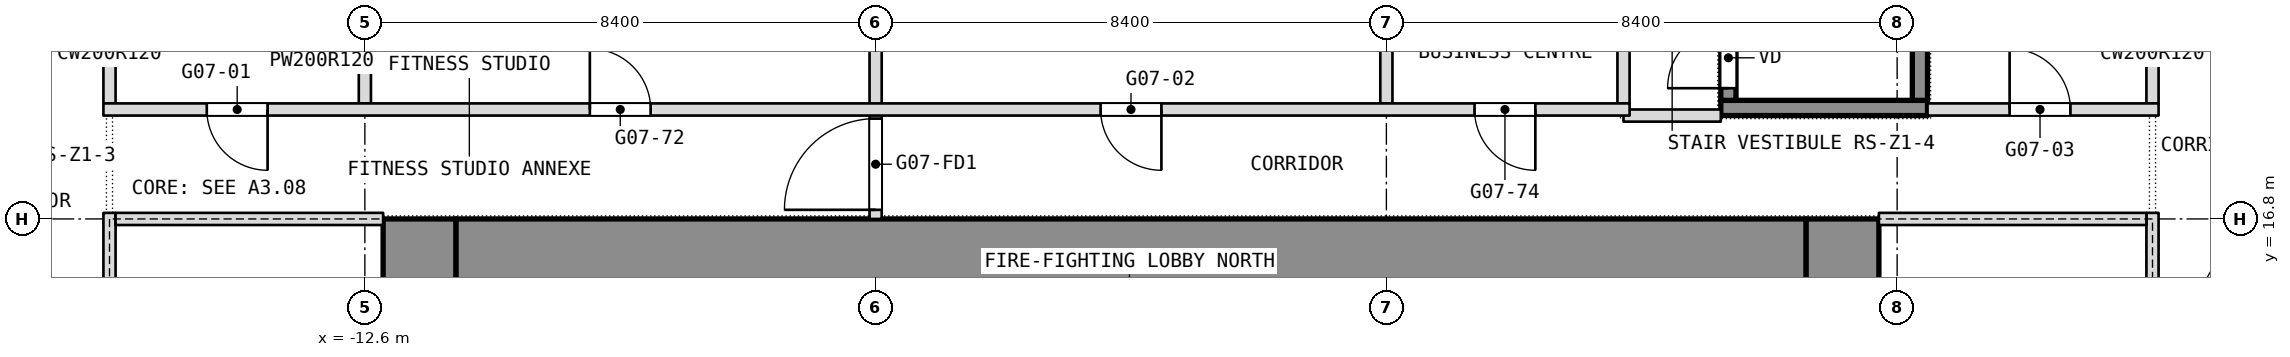
"""IFC4 building model, lengths in metres.
Left out: names, types, materials, properties, quantities, classifications, styles, units other than length and angle.
Written with IfcOpenShell. Run it as: python <this file> out.ifc"""

import sys

from ifc_helpers import new_model, si_unit, direction, frame, frame_2d, origin, place, context, subcontext, project, spatial, rectangle, extrude, element, fill, save


model = new_model("IFC4")
c1 = context("Model", 3, precision=1e-05, world=origin(), true_north=direction((0.0, 1.0)))
c2 = subcontext(c1, "Body", "Model", "MODEL_VIEW")
j1 = project(units=[si_unit("LENGTHUNIT", "METRE"), si_unit("PLANEANGLEUNIT", "RADIAN")], contexts=[c1])
p1 = place(None, origin())
s1 = spatial("IfcSite", under=j1, at=p1, CompositionType="ELEMENT")
p2 = place(p1, origin())
s2 = spatial("IfcBuilding", under=s1, at=p2, CompositionType="ELEMENT")
p3 = place(p2, frame((0.0, 0.0, 79.7)))
s3 = spatial("IfcBuildingStorey", under=s2, at=p3, CompositionType="ELEMENT", Elevation=79.7)
p4 = place(p3, frame((11.7, 0.0, 0.0), z_axis=(0.0, 0.0, 1.0), x_axis=(0.0, 1.0, 0.0)))
e1 = element("IfcWall", 1, at=p4, inside=s3, PredefinedType="SHEAR", context=c2, shape_type="SweptSolid", body=[
    extrude(rectangle(XDim=16.8, YDim=1.2, at=frame_2d((8.4, 0.0))), origin(), (0.0, 0.0, 1.0), 3.6),
])
p5 = place(p4, frame((3.6, 0.0, 0.0)))
e2 = element("IfcOpeningElement", 2, at=p5, cuts=e1, PredefinedType="OPENING", context=c2, shape_type="SweptSolid", body=[
    extrude(rectangle(XDim=0.9, YDim=2.1, at=frame_2d((0.45, 1.05))), frame((0.0, 0.6, 0.0), z_axis=(0.0, -1.0, 0.0), x_axis=(1.0, 0.0, 0.0)), (0.0, 0.0, 1.0), 1.2),
])
p6 = place(p4, frame((6.825, 0.0, 0.0)))
e3 = element("IfcOpeningElement", 3, at=p6, cuts=e1, PredefinedType="OPENING", context=c2, shape_type="SweptSolid", body=[
    extrude(rectangle(XDim=1.2, YDim=2.1, at=frame_2d((0.6, 1.05))), frame((0.0, 0.6, 0.0), z_axis=(0.0, -1.0, 0.0), x_axis=(1.0, 0.0, 0.0)), (0.0, 0.0, 1.0), 1.2),
])
p7 = place(p4, frame((14.212, 0.0, 0.0)))
e4 = element("IfcOpeningElement", 4, at=p7, cuts=e1, PredefinedType="OPENING", context=c2, shape_type="SweptSolid", body=[
    extrude(rectangle(XDim=0.9, YDim=2.1, at=frame_2d((0.45, 1.05))), frame((0.0, 0.6, 0.0), z_axis=(0.0, -1.0, 0.0), x_axis=(1.0, 0.0, 0.0)), (0.0, 0.0, 1.0), 1.2),
])
p8 = place(p4, frame((11.587, 0.0, 0.0)))
e5 = element("IfcOpeningElement", 5, at=p8, cuts=e1, PredefinedType="OPENING", context=c2, shape_type="SweptSolid", body=[
    extrude(rectangle(XDim=0.9, YDim=2.1, at=frame_2d((0.45, 1.05))), frame((0.0, 0.6, 0.0), z_axis=(0.0, -1.0, 0.0), x_axis=(1.0, 0.0, 0.0)), (0.0, 0.0, 1.0), 1.2),
])
p9 = place(p4, frame((8.775, 0.0, 0.0)))
e6 = element("IfcOpeningElement", 6, at=p9, cuts=e1, PredefinedType="OPENING", context=c2, shape_type="SweptSolid", body=[
    extrude(rectangle(XDim=1.2, YDim=2.1, at=frame_2d((0.6, 1.05))), frame((0.0, 0.6, 0.0), z_axis=(0.0, -1.0, 0.0), x_axis=(1.0, 0.0, 0.0)), (0.0, 0.0, 1.0), 1.2),
])
p10 = place(p3, frame((-11.7, 0.0, 0.0), z_axis=(0.0, 0.0, 1.0), x_axis=(0.0, 1.0, 0.0)))
e7 = element("IfcWall", 7, at=p10, inside=s3, PredefinedType="SHEAR", context=c2, shape_type="SweptSolid", body=[
    extrude(rectangle(XDim=16.8, YDim=1.2, at=frame_2d((8.4, 0.0))), origin(), (0.0, 0.0, 1.0), 3.6),
])
p11 = place(p10, frame((2.3, 0.0, 0.0)))
e8 = element("IfcOpeningElement", 8, at=p11, cuts=e7, PredefinedType="OPENING", context=c2, shape_type="SweptSolid", body=[
    extrude(rectangle(XDim=1.1, YDim=2.1, at=frame_2d((0.55, 1.05))), frame((0.0, 0.6, 0.0), z_axis=(0.0, -1.0, 0.0), x_axis=(1.0, 0.0, 0.0)), (0.0, 0.0, 1.0), 1.2),
])
p12 = place(p10, frame((4.85, 0.0, 0.0)))
e9 = element("IfcOpeningElement", 9, at=p12, cuts=e7, PredefinedType="OPENING", context=c2, shape_type="SweptSolid", body=[
    extrude(rectangle(XDim=1.1, YDim=2.1, at=frame_2d((0.55, 1.05))), frame((0.0, 0.6, 0.0), z_axis=(0.0, -1.0, 0.0), x_axis=(1.0, 0.0, 0.0)), (0.0, 0.0, 1.0), 1.2),
])
p13 = place(p10, frame((6.825, 0.0, 0.0)))
e10 = element("IfcOpeningElement", 10, at=p13, cuts=e7, PredefinedType="OPENING", context=c2, shape_type="SweptSolid", body=[
    extrude(rectangle(XDim=1.2, YDim=2.1, at=frame_2d((0.6, 1.05))), frame((0.0, 0.6, 0.0), z_axis=(0.0, -1.0, 0.0), x_axis=(1.0, 0.0, 0.0)), (0.0, 0.0, 1.0), 1.2),
])
p14 = place(p10, frame((13.4, 0.0, 0.0)))
e11 = element("IfcOpeningElement", 11, at=p14, cuts=e7, PredefinedType="OPENING", context=c2, shape_type="SweptSolid", body=[
    extrude(rectangle(XDim=1.1, YDim=2.1, at=frame_2d((0.55, 1.05))), frame((0.0, 0.6, 0.0), z_axis=(0.0, -1.0, 0.0), x_axis=(1.0, 0.0, 0.0)), (0.0, 0.0, 1.0), 1.2),
])
p15 = place(p10, frame((10.85, 0.0, 0.0)))
e12 = element("IfcOpeningElement", 12, at=p15, cuts=e7, PredefinedType="OPENING", context=c2, shape_type="SweptSolid", body=[
    extrude(rectangle(XDim=1.1, YDim=2.1, at=frame_2d((0.55, 1.05))), frame((0.0, 0.6, 0.0), z_axis=(0.0, -1.0, 0.0), x_axis=(1.0, 0.0, 0.0)), (0.0, 0.0, 1.0), 1.2),
])
p16 = place(p10, frame((8.775, 0.0, 0.0)))
e13 = element("IfcOpeningElement", 13, at=p16, cuts=e7, PredefinedType="OPENING", context=c2, shape_type="SweptSolid", body=[
    extrude(rectangle(XDim=1.2, YDim=2.1, at=frame_2d((0.6, 1.05))), frame((0.0, 0.6, 0.0), z_axis=(0.0, -1.0, 0.0), x_axis=(1.0, 0.0, 0.0)), (0.0, 0.0, 1.0), 1.2),
])
p17 = place(p3, frame((-11.1, 16.2, 0.0), z_axis=(0.0, 0.0, 1.0), x_axis=(1.0, 0.0, 0.0)))
e14 = element("IfcWall", 14, at=p17, inside=s3, PredefinedType="SHEAR", context=c2, shape_type="SweptSolid", body=[
    extrude(rectangle(XDim=22.2, YDim=1.2, at=frame_2d((11.1, 0.0))), origin(), (0.0, 0.0, 1.0), 3.6),
])
p18 = place(p3, frame((16.8, 18.7, 0.0), z_axis=(0.0, 0.0, 1.0), x_axis=(0.0, 1.0, 0.0)))
e15 = element("IfcWall", 15, at=p18, inside=s3, PredefinedType="PARTITIONING", context=c2, shape_type="SweptSolid", body=[
    extrude(rectangle(XDim=3.0, YDim=0.2, at=frame_2d((1.5, 0.0))), origin(), (0.0, 0.0, 1.0), 3.34),
])
for number, where, z_axis, x_axis in (
    (16, (8.1, 18.7, 0.0), (0.0, 0.0, 1.0), (0.0, 1.0, 0.0)),
    (17, (4.2, 18.7, 0.0), (0.0, 0.0, 1.0), (0.0, 1.0, 0.0)),
):
    element("IfcWall", number, at=place(p3, frame(where, z_axis=z_axis, x_axis=x_axis)), inside=s3, PredefinedType="PARTITIONING", context=c2, shape_type="SweptSolid", body=[
        extrude(rectangle(XDim=2.8, YDim=0.2, at=frame_2d((1.4, 0.0))), origin(), (0.0, 0.0, 1.0), 3.34),
    ])
p19 = place(p3, frame((-4.2, 16.8, 0.0), z_axis=(0.0, 0.0, 1.0), x_axis=(0.0, 1.0, 0.0)))
e18 = element("IfcWall", 18, at=p19, inside=s3, PredefinedType="PARTITIONING", context=c2, shape_type="SweptSolid", body=[
    extrude(rectangle(XDim=6.7, YDim=0.2, at=frame_2d((3.35, 0.0))), origin(), (0.0, 0.0, 1.0), 3.34),
])
p20 = place(p19, frame((0.15, 0.0, 0.0)))
e19 = element("IfcOpeningElement", 19, at=p20, cuts=e18, PredefinedType="OPENING", context=c2, shape_type="SweptSolid", body=[
    extrude(rectangle(XDim=1.5, YDim=2.1, at=frame_2d((0.75, 1.05))), frame((0.0, 0.1, 0.0), z_axis=(0.0, -1.0, 0.0), x_axis=(1.0, 0.0, 0.0)), (0.0, 0.0, 1.0), 0.2),
])
p21 = place(p19, frame((4.95, 0.0, 0.0)))
e20 = element("IfcOpeningElement", 20, at=p21, cuts=e18, PredefinedType="OPENING", context=c2, shape_type="SweptSolid", body=[
    extrude(rectangle(XDim=1.5, YDim=2.1, at=frame_2d((0.75, 1.05))), frame((0.0, 0.1, 0.0), z_axis=(0.0, -1.0, 0.0), x_axis=(1.0, 0.0, 0.0)), (0.0, 0.0, 1.0), 0.2),
])
p22 = place(p3, frame((-12.6, 18.7, 0.0), z_axis=(0.0, 0.0, 1.0), x_axis=(0.0, 1.0, 0.0)))
e21 = element("IfcWall", 21, at=p22, inside=s3, PredefinedType="PARTITIONING", context=c2, shape_type="SweptSolid", body=[
    extrude(rectangle(XDim=2.8, YDim=0.2, at=frame_2d((1.4, 0.0))), origin(), (0.0, 0.0, 1.0), 3.34),
])
p23 = place(p3, frame((-16.8, 18.7, 0.0), z_axis=(0.0, 0.0, 1.0), x_axis=(0.0, 1.0, 0.0)))
e22 = element("IfcWall", 22, at=p23, inside=s3, PredefinedType="PARTITIONING", context=c2, shape_type="SweptSolid", body=[
    extrude(rectangle(XDim=3.0, YDim=0.2, at=frame_2d((1.5, 0.0))), origin(), (0.0, 0.0, 1.0), 3.34),
])
p24 = place(p3, frame((8.1, 18.5, 0.0), z_axis=(0.0, 0.0, 1.0), x_axis=(1.0, 0.0, 0.0)))
e23 = element("IfcWall", 23, at=p24, inside=s3, PredefinedType="PARTITIONING", context=c2, shape_type="SweptSolid", body=[
    extrude(rectangle(XDim=1.6, YDim=0.2, at=frame_2d((0.8, 0.0))), origin(), (0.0, 0.0, 1.0), 3.34),
])
p25 = place(p3, frame((-16.9, 18.6, 0.0), z_axis=(0.0, 0.0, 1.0), x_axis=(1.0, 0.0, 0.0)))
e24 = element("IfcWall", 24, at=p25, inside=s3, PredefinedType="PARTITIONING", context=c2, shape_type="SweptSolid", body=[
    extrude(rectangle(XDim=25.1, YDim=0.2, at=frame_2d((12.55, 0.0))), origin(), (0.0, 0.0, 1.0), 3.34),
])
p26 = place(p25, frame((1.7, 0.0, 0.0)))
e25 = element("IfcOpeningElement", 25, at=p26, cuts=e24, PredefinedType="OPENING", context=c2, shape_type="SweptSolid", body=[
    extrude(rectangle(XDim=1.0, YDim=2.1, at=frame_2d((0.5, 1.05))), frame((0.0, 0.1, 0.0), z_axis=(0.0, -1.0, 0.0), x_axis=(1.0, 0.0, 0.0)), (0.0, 0.0, 1.0), 0.2),
])
p27 = place(p25, frame((16.4, 0.0, 0.0)))
e26 = element("IfcOpeningElement", 26, at=p27, cuts=e24, PredefinedType="OPENING", context=c2, shape_type="SweptSolid", body=[
    extrude(rectangle(XDim=1.0, YDim=2.1, at=frame_2d((0.5, 1.05))), frame((0.0, 0.1, 0.0), z_axis=(0.0, -1.0, 0.0), x_axis=(1.0, 0.0, 0.0)), (0.0, 0.0, 1.0), 0.2),
])
p28 = place(p25, frame((8.0, 0.0, 0.0)))
e27 = element("IfcOpeningElement", 27, at=p28, cuts=e24, PredefinedType="OPENING", context=c2, shape_type="SweptSolid", body=[
    extrude(rectangle(XDim=1.0, YDim=2.1, at=frame_2d((0.5, 1.05))), frame((0.0, 0.1, 0.0), z_axis=(0.0, -1.0, 0.0), x_axis=(1.0, 0.0, 0.0)), (0.0, 0.0, 1.0), 0.2),
])
p29 = place(p25, frame((22.55, 0.0, 0.0)))
e28 = element("IfcOpeningElement", 28, at=p29, cuts=e24, PredefinedType="OPENING", context=c2, shape_type="SweptSolid", body=[
    extrude(rectangle(XDim=1.0, YDim=2.1, at=frame_2d((0.5, 1.05))), frame((0.0, 0.1, 0.0), z_axis=(0.0, -1.0, 0.0), x_axis=(1.0, 0.0, 0.0)), (0.0, 0.0, 1.0), 0.2),
])
p30 = place(p3, frame((13.1, 18.6, 0.0), z_axis=(0.0, 0.0, 1.0), x_axis=(1.0, 0.0, 0.0)))
e29 = element("IfcWall", 29, at=p30, inside=s3, PredefinedType="PARTITIONING", context=c2, shape_type="SweptSolid", body=[
    extrude(rectangle(XDim=3.8, YDim=0.2, at=frame_2d((1.9, 0.0))), origin(), (0.0, 0.0, 1.0), 3.34),
])
p31 = place(p30, frame((1.35, 0.0, 0.0)))
e30 = element("IfcOpeningElement", 30, at=p31, cuts=e29, PredefinedType="OPENING", context=c2, shape_type="SweptSolid", body=[
    extrude(rectangle(XDim=1.0, YDim=2.1, at=frame_2d((0.5, 1.05))), frame((0.0, 0.1, 0.0), z_axis=(0.0, -1.0, 0.0), x_axis=(1.0, 0.0, 0.0)), (0.0, 0.0, 1.0), 0.2),
])
p32 = place(p3, frame((-16.8, -0.1, 0.0), z_axis=(0.0, 0.0, 1.0), x_axis=(0.0, 1.0, 0.0)))
e31 = element("IfcWall", 31, at=p32, inside=s3, PredefinedType="PARTITIONING", context=c2, shape_type="SweptSolid", body=[
    extrude(rectangle(XDim=17.0, YDim=0.2, at=frame_2d((8.5, 0.0))), origin(), (0.0, 0.0, 1.0), 3.34),
])
p33 = place(p32, frame((2.2, 0.0, 0.0)))
e32 = element("IfcOpeningElement", 32, at=p33, cuts=e31, PredefinedType="OPENING", context=c2, shape_type="SweptSolid", body=[
    extrude(rectangle(XDim=1.8, YDim=2.1, at=frame_2d((0.9, 1.05))), frame((0.0, 0.1, 0.0), z_axis=(0.0, -1.0, 0.0), x_axis=(1.0, 0.0, 0.0)), (0.0, 0.0, 1.0), 0.2),
])
p34 = place(p32, frame((7.2, 0.0, 0.0)))
e33 = element("IfcOpeningElement", 33, at=p34, cuts=e31, PredefinedType="OPENING", context=c2, shape_type="SweptSolid", body=[
    extrude(rectangle(XDim=1.8, YDim=2.1, at=frame_2d((0.9, 1.05))), frame((0.0, 0.1, 0.0), z_axis=(0.0, -1.0, 0.0), x_axis=(1.0, 0.0, 0.0)), (0.0, 0.0, 1.0), 0.2),
])
p35 = place(p3, frame((-16.7, 16.8, 0.0), z_axis=(0.0, 0.0, 1.0), x_axis=(1.0, 0.0, 0.0)))
e34 = element("IfcWall", 34, at=p35, inside=s3, PredefinedType="PARTITIONING", context=c2, shape_type="SweptSolid", body=[
    extrude(rectangle(XDim=4.4, YDim=0.2, at=frame_2d((2.2, 0.0))), origin(), (0.0, 0.0, 1.0), 2.84),
])
p36 = place(p3, frame((16.8, -0.1, 0.0), z_axis=(0.0, 0.0, 1.0), x_axis=(0.0, 1.0, 0.0)))
e35 = element("IfcWall", 35, at=p36, inside=s3, PredefinedType="PARTITIONING", context=c2, shape_type="SweptSolid", body=[
    extrude(rectangle(XDim=17.0, YDim=0.2, at=frame_2d((8.5, 0.0))), origin(), (0.0, 0.0, 1.0), 3.34),
])
p37 = place(p36, frame((2.2, 0.0, 0.0)))
e36 = element("IfcOpeningElement", 36, at=p37, cuts=e35, PredefinedType="OPENING", context=c2, shape_type="SweptSolid", body=[
    extrude(rectangle(XDim=1.8, YDim=2.1, at=frame_2d((0.9, 1.05))), frame((0.0, 0.1, 0.0), z_axis=(0.0, -1.0, 0.0), x_axis=(1.0, 0.0, 0.0)), (0.0, 0.0, 1.0), 0.2),
])
p38 = place(p36, frame((13.0, 0.0, 0.0)))
e37 = element("IfcOpeningElement", 37, at=p38, cuts=e35, PredefinedType="OPENING", context=c2, shape_type="SweptSolid", body=[
    extrude(rectangle(XDim=1.8, YDim=2.1, at=frame_2d((0.9, 1.05))), frame((0.0, 0.1, 0.0), z_axis=(0.0, -1.0, 0.0), x_axis=(1.0, 0.0, 0.0)), (0.0, 0.0, 1.0), 0.2),
])
p39 = place(p3, frame((12.3, 16.8, 0.0), z_axis=(0.0, 0.0, 1.0), x_axis=(1.0, 0.0, 0.0)))
e38 = element("IfcWall", 38, at=p39, inside=s3, PredefinedType="PARTITIONING", context=c2, shape_type="SweptSolid", body=[
    extrude(rectangle(XDim=4.4, YDim=0.2, at=frame_2d((2.2, 0.0))), origin(), (0.0, 0.0, 1.0), 2.84),
])
p40 = place(p3, frame((9.7, 18.625, 0.1), z_axis=(0.0, 0.0, 1.0), x_axis=(1.0, 0.0, 0.0)))
e39 = element("IfcWall", 39, at=p40, inside=s3, PredefinedType="SHEAR", context=c2, shape_type="SweptSolid", body=[
    extrude(rectangle(XDim=3.4, YDim=0.25, at=frame_2d((1.7, 0.0))), origin(), (0.0, 0.0, 1.0), 3.6),
])
p41 = place(p3, frame((9.825, 18.75, 0.1), z_axis=(0.0, 0.0, 1.0), x_axis=(0.0, 1.0, 0.0)))
e40 = element("IfcWall", 40, at=p41, inside=s3, PredefinedType="SHEAR", context=c2, shape_type="SweptSolid", body=[
    extrude(rectangle(XDim=5.7, YDim=0.25, at=frame_2d((2.85, 0.0))), origin(), (0.0, 0.0, 1.0), 3.6),
])
p42 = place(p41, frame((0.2, 0.0, 0.0)))
e41 = element("IfcOpeningElement", 41, at=p42, cuts=e40, PredefinedType="OPENING", context=c2, shape_type="SweptSolid", body=[
    extrude(rectangle(XDim=1.0, YDim=2.1, at=frame_2d((0.5, 1.05))), frame((0.0, 0.125, 0.0), z_axis=(0.0, -1.0, 0.0), x_axis=(1.0, 0.0, 0.0)), (0.0, 0.0, 1.0), 0.25),
])
p43 = place(p3, frame((12.975, 18.75, 0.1), z_axis=(0.0, 0.0, 1.0), x_axis=(0.0, 1.0, 0.0)))
e42 = element("IfcWall", 42, at=p43, inside=s3, PredefinedType="SHEAR", context=c2, shape_type="SweptSolid", body=[
    extrude(rectangle(XDim=5.7, YDim=0.25, at=frame_2d((2.85, 0.0))), origin(), (0.0, 0.0, 1.0), 3.6),
])
p44 = place(p26, origin())
e43 = element("IfcDoor", 43, at=p44, inside=s3, OperationType="SINGLE_SWING_RIGHT", PredefinedType="DOOR", context=c2, shape_type="SweptSolid", body=[
    extrude(rectangle(XDim=1.0, YDim=2.1, at=frame_2d((0.5, 1.05))), frame((0.0, 0.025, 0.0), z_axis=(0.0, -1.0, 0.0), x_axis=(1.0, 0.0, 0.0)), (0.0, 0.0, 1.0), 0.05),
])
fill(e25, e43)
p45 = place(p27, origin())
e44 = element("IfcDoor", 44, at=p45, inside=s3, OperationType="SINGLE_SWING_LEFT", PredefinedType="DOOR", context=c2, shape_type="SweptSolid", body=[
    extrude(rectangle(XDim=1.0, YDim=2.1, at=frame_2d((0.5, 1.05))), frame((0.0, 0.025, 0.0), z_axis=(0.0, -1.0, 0.0), x_axis=(1.0, 0.0, 0.0)), (0.0, 0.0, 1.0), 0.05),
])
fill(e26, e44)
p46 = place(p28, origin())
e45 = element("IfcDoor", 45, at=p46, inside=s3, OperationType="SINGLE_SWING_RIGHT", PredefinedType="DOOR", context=c2, shape_type="SweptSolid", body=[
    extrude(rectangle(XDim=1.0, YDim=2.1, at=frame_2d((0.5, 1.05))), frame((0.0, 0.025, 0.0), z_axis=(0.0, -1.0, 0.0), x_axis=(1.0, 0.0, 0.0)), (0.0, 0.0, 1.0), 0.05),
])
fill(e27, e45)
p47 = place(p29, origin())
e46 = element("IfcDoor", 46, at=p47, inside=s3, OperationType="SINGLE_SWING_RIGHT", PredefinedType="DOOR", context=c2, shape_type="SweptSolid", body=[
    extrude(rectangle(XDim=1.0, YDim=2.1, at=frame_2d((0.5, 1.05))), frame((0.0, 0.025, 0.0), z_axis=(0.0, -1.0, 0.0), x_axis=(1.0, 0.0, 0.0)), (0.0, 0.0, 1.0), 0.05),
])
fill(e28, e46)
p48 = place(p31, origin())
e47 = element("IfcDoor", 47, at=p48, inside=s3, OperationType="SINGLE_SWING_RIGHT", PredefinedType="DOOR", context=c2, shape_type="SweptSolid", body=[
    extrude(rectangle(XDim=1.0, YDim=2.1, at=frame_2d((0.5, 1.05))), frame((0.0, 0.025, 0.0), z_axis=(0.0, -1.0, 0.0), x_axis=(1.0, 0.0, 0.0)), (0.0, 0.0, 1.0), 0.05),
])
fill(e30, e47)
p49 = place(p42, origin())
e48 = element("IfcDoor", 48, at=p49, inside=s3, OperationType="SINGLE_SWING_LEFT", PredefinedType="DOOR", context=c2, shape_type="SweptSolid", body=[
    extrude(rectangle(XDim=1.0, YDim=2.1, at=frame_2d((0.5, 1.05))), frame((0.0, 0.025, 0.0), z_axis=(0.0, -1.0, 0.0), x_axis=(1.0, 0.0, 0.0)), (0.0, 0.0, 1.0), 0.05),
])
fill(e41, e48)
p50 = place(p20, origin())
e49 = element("IfcDoor", 49, at=p50, inside=s3, OperationType="DOUBLE_DOOR_DOUBLE_SWING", PredefinedType="DOOR", context=c2, shape_type="SweptSolid", body=[
    extrude(rectangle(XDim=1.5, YDim=2.1, at=frame_2d((0.75, 1.05))), frame((0.0, 0.025, 0.0), z_axis=(0.0, -1.0, 0.0), x_axis=(1.0, 0.0, 0.0)), (0.0, 0.0, 1.0), 0.05),
])
fill(e19, e49)
save(model, sys.argv[1])
